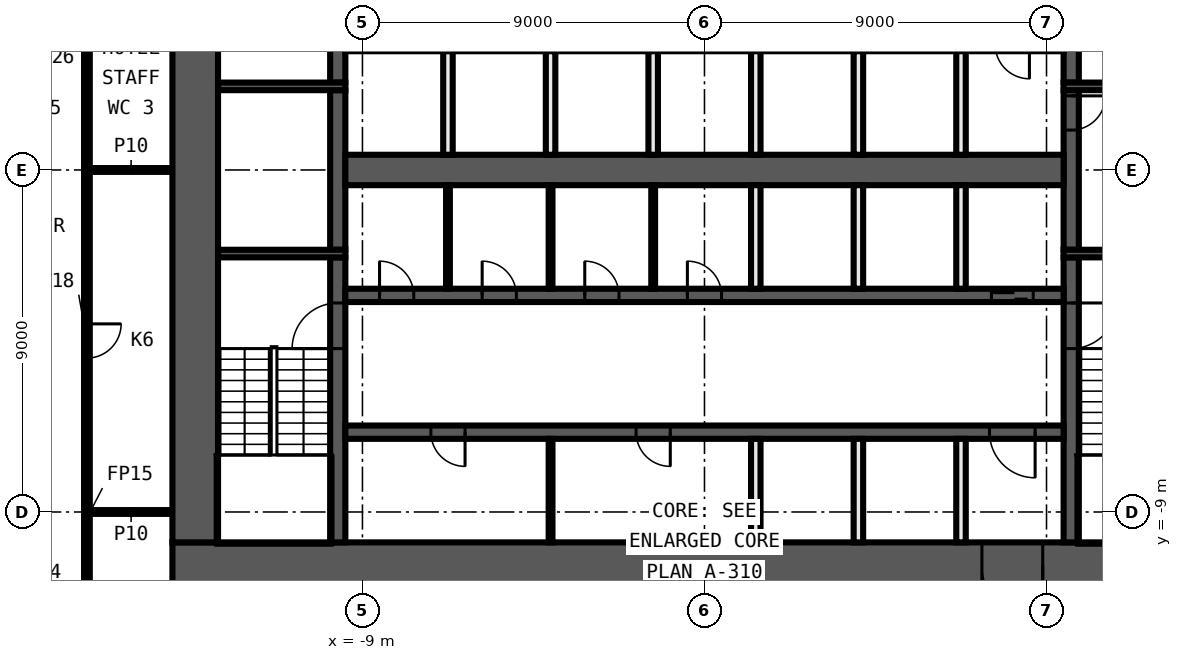
"""IFC4 building model, lengths in metres.
Left out: names, types, materials, properties, quantities, classifications, styles, units other than length and angle.
Written with IfcOpenShell. Run it as: python <this file> out.ifc"""

import sys

from ifc_helpers import new_model, si_unit, direction, frame, frame_2d, origin, place, context, subcontext, project, spatial, rectangle, extrude, element, fill, save


model = new_model("IFC4")
c1 = context("Model", 3, precision=1e-05, world=origin(), true_north=direction((0.0, 1.0)))
c2 = subcontext(c1, "Body", "Model", "MODEL_VIEW")
j1 = project(units=[si_unit("LENGTHUNIT", "METRE"), si_unit("PLANEANGLEUNIT", "RADIAN")], contexts=[c1])
p1 = place(None, origin())
s1 = spatial("IfcSite", under=j1, at=p1, CompositionType="ELEMENT")
p2 = place(p1, origin())
s2 = spatial("IfcBuilding", under=s1, at=p2, CompositionType="ELEMENT")
p3 = place(p2, frame((0.0, 0.0, 73.6)))
s3 = spatial("IfcBuildingStorey", under=s2, at=p3, CompositionType="ELEMENT", Elevation=73.6)
for number, where, z_axis, x_axis in (
    (1, (-16.175, -9.0, 0.0), (0.0, 0.0, 1.0), (1.0, 0.0, 0.0)),
    (2, (-16.175, 0.0, 0.0), (0.0, 0.0, 1.0), (1.0, 0.0, 0.0)),
):
    element("IfcWall", number, at=place(p3, frame(where, z_axis=z_axis, x_axis=x_axis)), inside=s3, PredefinedType="PARTITIONING", context=c2, shape_type="SweptSolid", body=[
        extrude(rectangle(XDim=2.175, YDim=0.1, at=frame_2d((1.087, 0.0))), origin(), (0.0, 0.0, 1.0), 3.3),
    ])
p4 = place(p3, frame((-16.25, 13.175, 0.0), z_axis=(0.0, 0.0, 1.0), x_axis=(0.0, -1.0, 0.0)))
e3 = element("IfcWall", 3, at=p4, inside=s3, PredefinedType="PARTITIONING", context=c2, shape_type="SweptSolid", body=[
    extrude(rectangle(XDim=26.35, YDim=0.15, at=frame_2d((13.175, 0.0))), origin(), (0.0, 0.0, 1.0), 3.3),
])
p5 = place(p4, frame((17.225, 0.0, 0.0)))
e4 = element("IfcOpeningElement", 4, at=p5, cuts=e3, PredefinedType="OPENING", context=c2, shape_type="SweptSolid", body=[
    extrude(rectangle(XDim=0.9, YDim=2.1, at=frame_2d((0.45, 1.05))), frame((0.0, 0.085, 0.0), z_axis=(0.0, -1.0, 0.0), x_axis=(1.0, 0.0, 0.0)), (0.0, 0.0, 1.0), 0.17),
])
p6 = place(p4, frame((8.225, 0.0, 0.0)))
e5 = element("IfcOpeningElement", 5, at=p6, cuts=e3, PredefinedType="OPENING", context=c2, shape_type="SweptSolid", body=[
    extrude(rectangle(XDim=0.9, YDim=2.1, at=frame_2d((0.45, 1.05))), frame((0.0, 0.085, 0.0), z_axis=(0.0, -1.0, 0.0), x_axis=(1.0, 0.0, 0.0)), (0.0, 0.0, 1.0), 0.17),
])
p7 = place(p3, frame((14.0, -10.4, 0.0), z_axis=(0.0, 0.0, 1.0), x_axis=(-1.0, 0.0, 0.0)))
e6 = element("IfcWall", 6, at=p7, inside=s3, PredefinedType="SHEAR", context=c2, shape_type="SweptSolid", body=[
    extrude(rectangle(XDim=28.0, YDim=1.2, at=frame_2d((14.0, 0.0))), origin(), (0.0, 0.0, 1.0), 3.3),
])
p8 = place(p7, frame((5.1, 0.0, 0.0)))
e7 = element("IfcOpeningElement", 7, at=p8, cuts=e6, PredefinedType="OPENING", context=c2, shape_type="SweptSolid", body=[
    extrude(rectangle(XDim=1.6, YDim=2.1, at=frame_2d((0.8, 1.05))), frame((0.0, 0.61, 0.0), z_axis=(0.0, -1.0, 0.0), x_axis=(1.0, 0.0, 0.0)), (0.0, 0.0, 1.0), 1.22),
])
p9 = place(p3, frame((-13.4, -9.8, 0.0), z_axis=(0.0, 0.0, 1.0), x_axis=(0.0, 1.0, 0.0)))
e8 = element("IfcWall", 8, at=p9, inside=s3, PredefinedType="SHEAR", context=c2, shape_type="SweptSolid", body=[
    extrude(rectangle(XDim=19.6, YDim=1.2, at=frame_2d((9.8, 0.0))), origin(), (0.0, 0.0, 1.0), 3.3),
])
p10 = place(p3, frame((9.65, -2.3, 0.0), z_axis=(0.0, 0.0, 1.0), x_axis=(0.0, -1.0, 0.0)))
e9 = element("IfcWall", 9, at=p10, inside=s3, PredefinedType="SHEAR", context=c2, shape_type="SweptSolid", body=[
    extrude(rectangle(XDim=7.5, YDim=0.4, at=frame_2d((3.75, 0.0))), origin(), (0.0, 0.0, 1.0), 3.3),
])
p11 = place(p10, frame((1.2, 0.0, 0.0)))
e10 = element("IfcOpeningElement", 10, at=p11, cuts=e9, PredefinedType="OPENING", context=c2, shape_type="SweptSolid", body=[
    extrude(rectangle(XDim=1.2, YDim=2.1, at=frame_2d((0.6, 1.05))), frame((0.0, 0.21, 0.0), z_axis=(0.0, -1.0, 0.0), x_axis=(1.0, 0.0, 0.0)), (0.0, 0.0, 1.0), 0.42),
])
p12 = place(p3, frame((9.65, 2.1, 0.0), z_axis=(0.0, 0.0, 1.0), x_axis=(0.0, -1.0, 0.0)))
e11 = element("IfcWall", 11, at=p12, inside=s3, PredefinedType="SHEAR", context=c2, shape_type="SweptSolid", body=[
    extrude(rectangle(XDim=4.2, YDim=0.4, at=frame_2d((2.1, 0.0))), origin(), (0.0, 0.0, 1.0), 3.3),
])
p13 = place(p12, frame((0.15, 0.0, 0.0)))
e12 = element("IfcOpeningElement", 12, at=p13, cuts=e11, PredefinedType="OPENING", context=c2, shape_type="SweptSolid", body=[
    extrude(rectangle(XDim=0.9, YDim=2.1, at=frame_2d((0.45, 1.05))), frame((0.0, 0.21, 0.0), z_axis=(0.0, -1.0, 0.0), x_axis=(1.0, 0.0, 0.0)), (0.0, 0.0, 1.0), 0.42),
])
p14 = place(p3, frame((9.65, 9.8, 0.0), z_axis=(0.0, 0.0, 1.0), x_axis=(0.0, -1.0, 0.0)))
e13 = element("IfcWall", 13, at=p14, inside=s3, PredefinedType="SHEAR", context=c2, shape_type="SweptSolid", body=[
    extrude(rectangle(XDim=7.5, YDim=0.4, at=frame_2d((3.75, 0.0))), origin(), (0.0, 0.0, 1.0), 3.3),
])
p15 = place(p14, frame((5.1, 0.0, 0.0)))
e14 = element("IfcOpeningElement", 14, at=p15, cuts=e13, PredefinedType="OPENING", context=c2, shape_type="SweptSolid", body=[
    extrude(rectangle(XDim=1.2, YDim=2.1, at=frame_2d((0.6, 1.05))), frame((0.0, 0.21, 0.0), z_axis=(0.0, -1.0, 0.0), x_axis=(1.0, 0.0, 0.0)), (0.0, 0.0, 1.0), 0.42),
])
p16 = place(p3, frame((-9.65, -9.8, 0.0), z_axis=(0.0, 0.0, 1.0), x_axis=(0.0, 1.0, 0.0)))
e15 = element("IfcWall", 15, at=p16, inside=s3, PredefinedType="SHEAR", context=c2, shape_type="SweptSolid", body=[
    extrude(rectangle(XDim=7.5, YDim=0.4, at=frame_2d((3.75, 0.0))), origin(), (0.0, 0.0, 1.0), 3.3),
])
p17 = place(p16, frame((5.1, 0.0, 0.0)))
e16 = element("IfcOpeningElement", 16, at=p17, cuts=e15, PredefinedType="OPENING", context=c2, shape_type="SweptSolid", body=[
    extrude(rectangle(XDim=1.2, YDim=2.1, at=frame_2d((0.6, 1.05))), frame((0.0, 0.21, 0.0), z_axis=(0.0, -1.0, 0.0), x_axis=(1.0, 0.0, 0.0)), (0.0, 0.0, 1.0), 0.42),
])
p18 = place(p3, frame((-9.65, -2.1, 0.0), z_axis=(0.0, 0.0, 1.0), x_axis=(0.0, 1.0, 0.0)))
e17 = element("IfcWall", 17, at=p18, inside=s3, PredefinedType="SHEAR", context=c2, shape_type="SweptSolid", body=[
    extrude(rectangle(XDim=4.2, YDim=0.4, at=frame_2d((2.1, 0.0))), origin(), (0.0, 0.0, 1.0), 3.3),
])
p19 = place(p3, frame((-9.65, 2.3, 0.0), z_axis=(0.0, 0.0, 1.0), x_axis=(0.0, 1.0, 0.0)))
e18 = element("IfcWall", 18, at=p19, inside=s3, PredefinedType="SHEAR", context=c2, shape_type="SweptSolid", body=[
    extrude(rectangle(XDim=7.5, YDim=0.4, at=frame_2d((3.75, 0.0))), origin(), (0.0, 0.0, 1.0), 3.3),
])
p20 = place(p19, frame((1.2, 0.0, 0.0)))
e19 = element("IfcOpeningElement", 19, at=p20, cuts=e18, PredefinedType="OPENING", context=c2, shape_type="SweptSolid", body=[
    extrude(rectangle(XDim=1.2, YDim=2.1, at=frame_2d((0.6, 1.05))), frame((0.0, 0.21, 0.0), z_axis=(0.0, -1.0, 0.0), x_axis=(1.0, 0.0, 0.0)), (0.0, 0.0, 1.0), 0.42),
])
for number, where, z_axis, x_axis in (
    (20, (9.45, 2.2, 0.0), (0.0, 0.0, 1.0), (1.0, 0.0, 0.0)),
    (21, (-9.45, 2.2, 0.0), (0.0, 0.0, 1.0), (-1.0, 0.0, 0.0)),
    (22, (9.45, -2.2, 0.0), (0.0, 0.0, 1.0), (1.0, 0.0, 0.0)),
    (23, (-9.45, -2.2, 0.0), (0.0, 0.0, 1.0), (-1.0, 0.0, 0.0)),
):
    element("IfcWall", number, at=place(p3, frame(where, z_axis=z_axis, x_axis=x_axis)), inside=s3, PredefinedType="SHEAR", context=c2, shape_type="SweptSolid", body=[
        extrude(rectangle(XDim=3.35, YDim=0.2, at=frame_2d((1.675, 0.0))), origin(), (0.0, 0.0, 1.0), 3.3),
    ])
p21 = place(p3, frame((-9.45, -3.3, 0.0), z_axis=(0.0, 0.0, 1.0), x_axis=(1.0, 0.0, 0.0)))
e24 = element("IfcWall", 24, at=p21, inside=s3, PredefinedType="SHEAR", context=c2, shape_type="SweptSolid", body=[
    extrude(rectangle(XDim=18.9, YDim=0.35, at=frame_2d((9.45, 0.0))), origin(), (0.0, 0.0, 1.0), 3.3),
])
p22 = place(p21, frame((17.0, 0.0, 0.0)))
e25 = element("IfcOpeningElement", 25, at=p22, cuts=e24, PredefinedType="OPENING", context=c2, shape_type="SweptSolid", body=[
    extrude(rectangle(XDim=1.1, YDim=2.1, at=frame_2d((0.55, 1.05))), frame((0.0, 0.185, 0.0), z_axis=(0.0, -1.0, 0.0), x_axis=(1.0, 0.0, 0.0)), (0.0, 0.0, 1.0), 0.37),
])
p23 = place(p21, frame((0.9, 0.0, 0.0)))
e26 = element("IfcOpeningElement", 26, at=p23, cuts=e24, PredefinedType="OPENING", context=c2, shape_type="SweptSolid", body=[
    extrude(rectangle(XDim=0.9, YDim=2.1, at=frame_2d((0.45, 1.05))), frame((0.0, 0.185, 0.0), z_axis=(0.0, -1.0, 0.0), x_axis=(1.0, 0.0, 0.0)), (0.0, 0.0, 1.0), 0.37),
])
p24 = place(p21, frame((3.6, 0.0, 0.0)))
e27 = element("IfcOpeningElement", 27, at=p24, cuts=e24, PredefinedType="OPENING", context=c2, shape_type="SweptSolid", body=[
    extrude(rectangle(XDim=0.9, YDim=2.1, at=frame_2d((0.45, 1.05))), frame((0.0, 0.185, 0.0), z_axis=(0.0, -1.0, 0.0), x_axis=(1.0, 0.0, 0.0)), (0.0, 0.0, 1.0), 0.37),
])
p25 = place(p21, frame((6.3, 0.0, 0.0)))
e28 = element("IfcOpeningElement", 28, at=p25, cuts=e24, PredefinedType="OPENING", context=c2, shape_type="SweptSolid", body=[
    extrude(rectangle(XDim=0.9, YDim=2.1, at=frame_2d((0.45, 1.05))), frame((0.0, 0.185, 0.0), z_axis=(0.0, -1.0, 0.0), x_axis=(1.0, 0.0, 0.0)), (0.0, 0.0, 1.0), 0.37),
])
p26 = place(p21, frame((9.0, 0.0, 0.0)))
e29 = element("IfcOpeningElement", 29, at=p26, cuts=e24, PredefinedType="OPENING", context=c2, shape_type="SweptSolid", body=[
    extrude(rectangle(XDim=0.9, YDim=2.1, at=frame_2d((0.45, 1.05))), frame((0.0, 0.185, 0.0), z_axis=(0.0, -1.0, 0.0), x_axis=(1.0, 0.0, 0.0)), (0.0, 0.0, 1.0), 0.37),
])
p27 = place(p3, frame((9.45, -6.9, 0.0), z_axis=(0.0, 0.0, 1.0), x_axis=(-1.0, 0.0, 0.0)))
e30 = element("IfcWall", 30, at=p27, inside=s3, PredefinedType="SHEAR", context=c2, shape_type="SweptSolid", body=[
    extrude(rectangle(XDim=18.9, YDim=0.35, at=frame_2d((9.45, 0.0))), origin(), (0.0, 0.0, 1.0), 3.3),
])
p28 = place(p27, frame((0.75, 0.0, 0.0)))
e31 = element("IfcOpeningElement", 31, at=p28, cuts=e30, PredefinedType="OPENING", context=c2, shape_type="SweptSolid", body=[
    extrude(rectangle(XDim=1.2, YDim=2.1, at=frame_2d((0.6, 1.05))), frame((0.0, 0.185, 0.0), z_axis=(0.0, -1.0, 0.0), x_axis=(1.0, 0.0, 0.0)), (0.0, 0.0, 1.0), 0.37),
])
p29 = place(p27, frame((15.75, 0.0, 0.0)))
e32 = element("IfcOpeningElement", 32, at=p29, cuts=e30, PredefinedType="OPENING", context=c2, shape_type="SweptSolid", body=[
    extrude(rectangle(XDim=0.9, YDim=2.1, at=frame_2d((0.45, 1.05))), frame((0.0, 0.185, 0.0), z_axis=(0.0, -1.0, 0.0), x_axis=(1.0, 0.0, 0.0)), (0.0, 0.0, 1.0), 0.37),
])
p30 = place(p27, frame((10.35, 0.0, 0.0)))
e33 = element("IfcOpeningElement", 33, at=p30, cuts=e30, PredefinedType="OPENING", context=c2, shape_type="SweptSolid", body=[
    extrude(rectangle(XDim=0.9, YDim=2.1, at=frame_2d((0.45, 1.05))), frame((0.0, 0.185, 0.0), z_axis=(0.0, -1.0, 0.0), x_axis=(1.0, 0.0, 0.0)), (0.0, 0.0, 1.0), 0.37),
])
p31 = place(p3, frame((-9.45, 0.0, 0.0), z_axis=(0.0, 0.0, 1.0), x_axis=(1.0, 0.0, 0.0)))
e34 = element("IfcWall", 34, at=p31, inside=s3, PredefinedType="SHEAR", context=c2, shape_type="SweptSolid", body=[
    extrude(rectangle(XDim=18.9, YDim=0.8, at=frame_2d((9.45, 0.0))), origin(), (0.0, 0.0, 1.0), 3.3),
])
for number, where, z_axis, x_axis in (
    (35, (6.75, -9.8, 0.0), (0.0, 0.0, 1.0), (0.0, 1.0, 0.0)),
    (36, (6.75, -3.125, 0.0), (0.0, 0.0, 1.0), (0.0, 1.0, 0.0)),
    (37, (6.75, 0.4, 0.0), (0.0, 0.0, 1.0), (0.0, 1.0, 0.0)),
    (38, (4.05, -9.8, 0.0), (0.0, 0.0, 1.0), (0.0, 1.0, 0.0)),
    (39, (4.05, -3.125, 0.0), (0.0, 0.0, 1.0), (0.0, 1.0, 0.0)),
    (40, (4.05, 0.4, 0.0), (0.0, 0.0, 1.0), (0.0, 1.0, 0.0)),
    (41, (1.35, -9.8, 0.0), (0.0, 0.0, 1.0), (0.0, 1.0, 0.0)),
    (42, (1.35, -3.125, 0.0), (0.0, 0.0, 1.0), (0.0, 1.0, 0.0)),
    (43, (1.35, 0.4, 0.0), (0.0, 0.0, 1.0), (0.0, 1.0, 0.0)),
):
    element("IfcWall", number, at=place(p3, frame(where, z_axis=z_axis, x_axis=x_axis)), inside=s3, PredefinedType="SOLIDWALL", context=c2, shape_type="SweptSolid", body=[
        extrude(rectangle(XDim=2.725, YDim=0.25, at=frame_2d((1.363, 0.0))), origin(), (0.0, 0.0, 1.0), 3.3),
    ])
p32 = place(p3, frame((-1.35, -3.125, 0.0), z_axis=(0.0, 0.0, 1.0), x_axis=(0.0, 1.0, 0.0)))
e44 = element("IfcWall", 44, at=p32, inside=s3, PredefinedType="PARTITIONING", context=c2, shape_type="SweptSolid", body=[
    extrude(rectangle(XDim=2.725, YDim=0.1, at=frame_2d((1.363, 0.0))), origin(), (0.0, 0.0, 1.0), 3.3),
])
p33 = place(p3, frame((-1.35, 0.4, 0.0), z_axis=(0.0, 0.0, 1.0), x_axis=(0.0, 1.0, 0.0)))
e45 = element("IfcWall", 45, at=p33, inside=s3, PredefinedType="SOLIDWALL", context=c2, shape_type="SweptSolid", body=[
    extrude(rectangle(XDim=2.725, YDim=0.25, at=frame_2d((1.363, 0.0))), origin(), (0.0, 0.0, 1.0), 3.3),
])
for number, where, z_axis, x_axis in (
    (46, (-4.05, -9.8, 0.0), (0.0, 0.0, 1.0), (0.0, 1.0, 0.0)),
    (47, (-4.05, -3.125, 0.0), (0.0, 0.0, 1.0), (0.0, 1.0, 0.0)),
):
    element("IfcWall", number, at=place(p3, frame(where, z_axis=z_axis, x_axis=x_axis)), inside=s3, PredefinedType="PARTITIONING", context=c2, shape_type="SweptSolid", body=[
        extrude(rectangle(XDim=2.725, YDim=0.1, at=frame_2d((1.363, 0.0))), origin(), (0.0, 0.0, 1.0), 3.3),
    ])
p34 = place(p3, frame((-4.05, 0.4, 0.0), z_axis=(0.0, 0.0, 1.0), x_axis=(0.0, 1.0, 0.0)))
e48 = element("IfcWall", 48, at=p34, inside=s3, PredefinedType="SOLIDWALL", context=c2, shape_type="SweptSolid", body=[
    extrude(rectangle(XDim=2.725, YDim=0.25, at=frame_2d((1.363, 0.0))), origin(), (0.0, 0.0, 1.0), 3.3),
])
p35 = place(p3, frame((-6.75, -3.125, 0.0), z_axis=(0.0, 0.0, 1.0), x_axis=(0.0, 1.0, 0.0)))
e49 = element("IfcWall", 49, at=p35, inside=s3, PredefinedType="PARTITIONING", context=c2, shape_type="SweptSolid", body=[
    extrude(rectangle(XDim=2.725, YDim=0.1, at=frame_2d((1.363, 0.0))), origin(), (0.0, 0.0, 1.0), 3.3),
])
p36 = place(p3, frame((-6.75, 0.4, 0.0), z_axis=(0.0, 0.0, 1.0), x_axis=(0.0, 1.0, 0.0)))
e50 = element("IfcWall", 50, at=p36, inside=s3, PredefinedType="SOLIDWALL", context=c2, shape_type="SweptSolid", body=[
    extrude(rectangle(XDim=2.725, YDim=0.25, at=frame_2d((1.363, 0.0))), origin(), (0.0, 0.0, 1.0), 3.3),
])
p37 = place(p5, origin())
e51 = element("IfcDoor", 51, at=p37, inside=s3, OperationType="SINGLE_SWING_RIGHT", PredefinedType="DOOR", context=c2, shape_type="SweptSolid", body=[
    extrude(rectangle(XDim=0.9, YDim=2.1, at=frame_2d((0.45, 1.05))), frame((0.0, 0.025, 0.0), z_axis=(0.0, -1.0, 0.0), x_axis=(1.0, 0.0, 0.0)), (0.0, 0.0, 1.0), 0.05),
])
fill(e4, e51)
p38 = place(p13, origin())
e52 = element("IfcDoor", 52, at=p38, inside=s3, OperationType="SINGLE_SWING_RIGHT", PredefinedType="DOOR", context=c2, shape_type="SweptSolid", body=[
    extrude(rectangle(XDim=0.9, YDim=2.1, at=frame_2d((0.45, 1.05))), frame((0.0, 0.025, 0.0), z_axis=(0.0, -1.0, 0.0), x_axis=(1.0, 0.0, 0.0)), (0.0, 0.0, 1.0), 0.05),
])
fill(e12, e52)
p39 = place(p22, origin())
e53 = element("IfcDoor", 53, at=p39, inside=s3, OperationType="DOUBLE_DOOR_SLIDING", PredefinedType="DOOR", context=c2, shape_type="SweptSolid", body=[
    extrude(rectangle(XDim=1.1, YDim=2.1, at=frame_2d((0.55, 1.05))), frame((0.0, 0.025, 0.0), z_axis=(0.0, -1.0, 0.0), x_axis=(1.0, 0.0, 0.0)), (0.0, 0.0, 1.0), 0.05),
])
fill(e25, e53)
p40 = place(p8, origin())
e54 = element("IfcDoor", 54, at=p40, inside=s3, OperationType="DOUBLE_DOOR_SINGLE_SWING", PredefinedType="DOOR", context=c2, shape_type="SweptSolid", body=[
    extrude(rectangle(XDim=1.6, YDim=2.1, at=frame_2d((0.8, 1.05))), frame((0.0, 0.025, 0.0), z_axis=(0.0, -1.0, 0.0), x_axis=(1.0, 0.0, 0.0)), (0.0, 0.0, 1.0), 0.05),
])
fill(e7, e54)
p41 = place(p28, origin())
e55 = element("IfcDoor", 55, at=p41, inside=s3, OperationType="SINGLE_SWING_LEFT", PredefinedType="DOOR", context=c2, shape_type="SweptSolid", body=[
    extrude(rectangle(XDim=1.2, YDim=2.1, at=frame_2d((0.6, 1.05))), frame((0.0, 0.025, 0.0), z_axis=(0.0, -1.0, 0.0), x_axis=(1.0, 0.0, 0.0)), (0.0, 0.0, 1.0), 0.05),
])
fill(e31, e55)
p42 = place(p23, origin())
e56 = element("IfcDoor", 56, at=p42, inside=s3, OperationType="SINGLE_SWING_RIGHT", PredefinedType="DOOR", context=c2, shape_type="SweptSolid", body=[
    extrude(rectangle(XDim=0.9, YDim=2.1, at=frame_2d((0.45, 1.05))), frame((0.0, 0.025, 0.0), z_axis=(0.0, -1.0, 0.0), x_axis=(1.0, 0.0, 0.0)), (0.0, 0.0, 1.0), 0.05),
])
fill(e26, e56)
p43 = place(p24, origin())
e57 = element("IfcDoor", 57, at=p43, inside=s3, OperationType="SINGLE_SWING_LEFT", PredefinedType="DOOR", context=c2, shape_type="SweptSolid", body=[
    extrude(rectangle(XDim=0.9, YDim=2.1, at=frame_2d((0.45, 1.05))), frame((0.0, 0.025, 0.0), z_axis=(0.0, -1.0, 0.0), x_axis=(1.0, 0.0, 0.0)), (0.0, 0.0, 1.0), 0.05),
])
fill(e27, e57)
p44 = place(p25, origin())
e58 = element("IfcDoor", 58, at=p44, inside=s3, OperationType="SINGLE_SWING_RIGHT", PredefinedType="DOOR", context=c2, shape_type="SweptSolid", body=[
    extrude(rectangle(XDim=0.9, YDim=2.1, at=frame_2d((0.45, 1.05))), frame((0.0, 0.025, 0.0), z_axis=(0.0, -1.0, 0.0), x_axis=(1.0, 0.0, 0.0)), (0.0, 0.0, 1.0), 0.05),
])
fill(e28, e58)
p45 = place(p26, origin())
e59 = element("IfcDoor", 59, at=p45, inside=s3, OperationType="SINGLE_SWING_LEFT", PredefinedType="DOOR", context=c2, shape_type="SweptSolid", body=[
    extrude(rectangle(XDim=0.9, YDim=2.1, at=frame_2d((0.45, 1.05))), frame((0.0, 0.025, 0.0), z_axis=(0.0, -1.0, 0.0), x_axis=(1.0, 0.0, 0.0)), (0.0, 0.0, 1.0), 0.05),
])
fill(e29, e59)
p46 = place(p29, origin())
e60 = element("IfcDoor", 60, at=p46, inside=s3, OperationType="SINGLE_SWING_RIGHT", PredefinedType="DOOR", context=c2, shape_type="SweptSolid", body=[
    extrude(rectangle(XDim=0.9, YDim=2.1, at=frame_2d((0.45, 1.05))), frame((0.0, 0.025, 0.0), z_axis=(0.0, -1.0, 0.0), x_axis=(1.0, 0.0, 0.0)), (0.0, 0.0, 1.0), 0.05),
])
fill(e32, e60)
p47 = place(p30, origin())
e61 = element("IfcDoor", 61, at=p47, inside=s3, OperationType="SINGLE_SWING_LEFT", PredefinedType="DOOR", context=c2, shape_type="SweptSolid", body=[
    extrude(rectangle(XDim=0.9, YDim=2.1, at=frame_2d((0.45, 1.05))), frame((0.0, 0.025, 0.0), z_axis=(0.0, -1.0, 0.0), x_axis=(1.0, 0.0, 0.0)), (0.0, 0.0, 1.0), 0.05),
])
fill(e33, e61)
p48 = place(p11, origin())
e62 = element("IfcDoor", 62, at=p48, inside=s3, OperationType="SINGLE_SWING_RIGHT", PredefinedType="DOOR", context=c2, shape_type="SweptSolid", body=[
    extrude(rectangle(XDim=1.2, YDim=2.1, at=frame_2d((0.6, 1.05))), frame((0.0, 0.025, 0.0), z_axis=(0.0, -1.0, 0.0), x_axis=(1.0, 0.0, 0.0)), (0.0, 0.0, 1.0), 0.05),
])
fill(e10, e62)
p49 = place(p17, origin())
e63 = element("IfcDoor", 63, at=p49, inside=s3, OperationType="SINGLE_SWING_LEFT", PredefinedType="DOOR", context=c2, shape_type="SweptSolid", body=[
    extrude(rectangle(XDim=1.2, YDim=2.1, at=frame_2d((0.6, 1.05))), frame((0.0, 0.025, 0.0), z_axis=(0.0, -1.0, 0.0), x_axis=(1.0, 0.0, 0.0)), (0.0, 0.0, 1.0), 0.05),
])
fill(e16, e63)
save(model, sys.argv[1])
